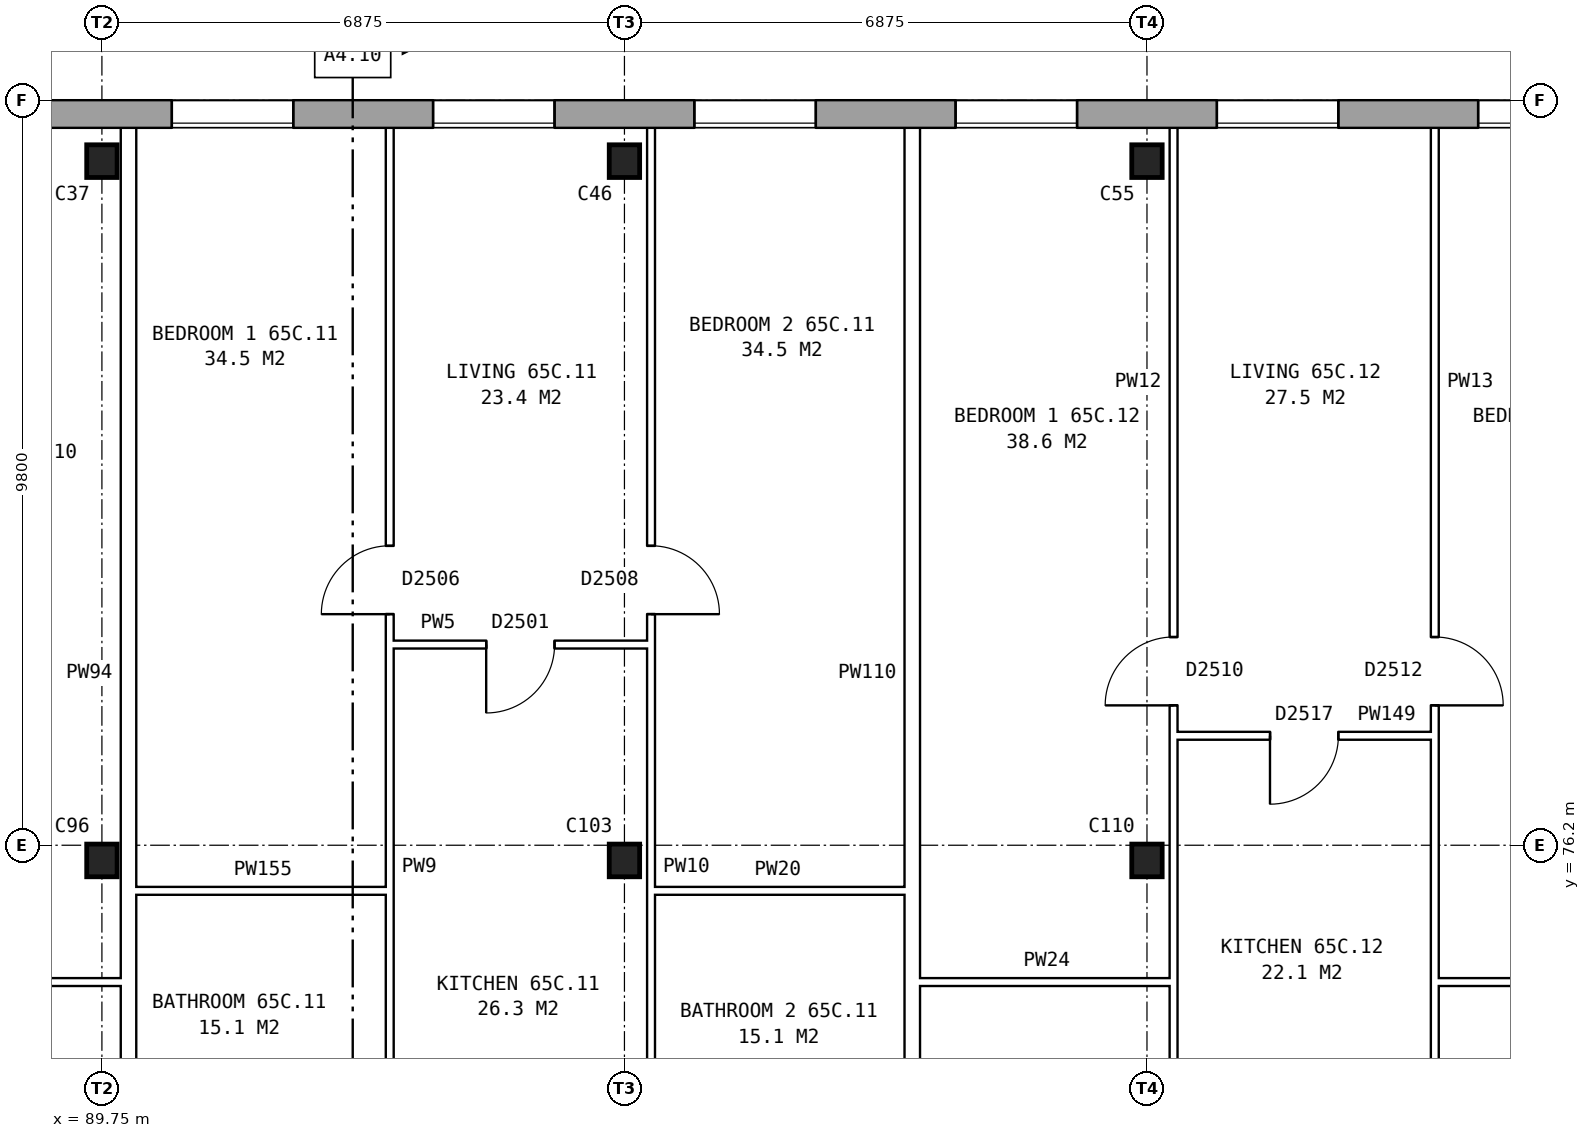
"""IFC4 building model, lengths in metres.
Left out: names, types, materials, properties, quantities, classifications, styles, units other than length and angle.
Written with IfcOpenShell. Run it as: python <this file> out.ifc"""

import sys

from ifc_helpers import new_model, si_unit, direction, frame, frame_2d, origin, origin_2d, place, context, subcontext, project, spatial, rectangle, i_section, extrude, element, fill, save


model = new_model("IFC4")
c1 = context("Model", 3, precision=1e-05, world=origin(), true_north=direction((0.0, 1.0)))
c2 = subcontext(c1, "Body", "Model", "MODEL_VIEW")
j1 = project(units=[si_unit("LENGTHUNIT", "METRE"), si_unit("PLANEANGLEUNIT", "RADIAN")], contexts=[c1])
p1 = place(None, origin())
s1 = spatial("IfcSite", under=j1, at=p1, CompositionType="ELEMENT")
p2 = place(p1, origin())
s2 = spatial("IfcBuilding", under=s1, at=p2, CompositionType="ELEMENT")
p3 = place(p2, frame((0.0, 0.0, 230.7)))
s3 = spatial("IfcBuildingStorey", under=s2, at=p3, CompositionType="ELEMENT", Elevation=230.7)
for number, where, z_axis, x_axis in (
    (1, (89.75, 76.0, 0.0), (0.0, 0.0, 1.0), (1.0, 0.0, 0.0)),
    (2, (96.625, 76.0, 0.0), (0.0, 0.0, 1.0), (1.0, 0.0, 0.0)),
    (3, (103.5, 76.0, 0.0), (0.0, 0.0, 1.0), (1.0, 0.0, 0.0)),
    (4, (89.75, 85.2, 0.0), (0.0, 0.0, 1.0), (1.0, 0.0, 0.0)),
    (5, (96.625, 85.2, 0.0), (0.0, 0.0, 1.0), (1.0, 0.0, 0.0)),
    (6, (103.5, 85.2, 0.0), (0.0, 0.0, 1.0), (1.0, 0.0, 0.0)),
):
    element("IfcColumn", number, at=place(p3, frame(where, z_axis=z_axis, x_axis=x_axis)), inside=s3, PredefinedType="COLUMN", context=c2, shape_type="SweptSolid", body=[
        extrude(i_section(OverallWidth=0.4, OverallDepth=0.43, WebThickness=0.028, FlangeThickness=0.04, at=origin_2d()), origin(), (0.0, 0.0, 1.0), 2.85),
    ])
p4 = place(p3, frame((131.05, 85.82, 0.0), z_axis=(0.0, 0.0, 1.0), x_axis=(-1.0, 0.0, 0.0)))
e7 = element("IfcWall", 7, at=p4, inside=s3, PredefinedType="STANDARD", context=c2, shape_type="SweptSolid", body=[
    extrude(rectangle(XDim=55.1, YDim=0.36, at=frame_2d((27.55, 0.0))), origin(), (0.0, 0.0, 1.0), 2.85),
])
p5 = place(p4, frame((0.969, 0.0, 0.8)))
e8 = element("IfcOpeningElement", 8, at=p5, cuts=e7, PredefinedType="OPENING", context=c2, shape_type="SweptSolid", body=[
    extrude(rectangle(XDim=1.6, YDim=1.8, at=frame_2d((0.8, 0.9))), frame((0.0, 0.19, 0.0), z_axis=(0.0, -1.0, 0.0), x_axis=(1.0, 0.0, 0.0)), (0.0, 0.0, 1.0), 0.38),
])
p6 = place(p4, frame((4.406, 0.0, 0.8)))
e9 = element("IfcOpeningElement", 9, at=p6, cuts=e7, PredefinedType="OPENING", context=c2, shape_type="SweptSolid", body=[
    extrude(rectangle(XDim=1.6, YDim=1.8, at=frame_2d((0.8, 0.9))), frame((0.0, 0.19, 0.0), z_axis=(0.0, -1.0, 0.0), x_axis=(1.0, 0.0, 0.0)), (0.0, 0.0, 1.0), 0.38),
])
p7 = place(p4, frame((7.844, 0.0, 0.8)))
e10 = element("IfcOpeningElement", 10, at=p7, cuts=e7, PredefinedType="OPENING", context=c2, shape_type="SweptSolid", body=[
    extrude(rectangle(XDim=1.6, YDim=1.8, at=frame_2d((0.8, 0.9))), frame((0.0, 0.19, 0.0), z_axis=(0.0, -1.0, 0.0), x_axis=(1.0, 0.0, 0.0)), (0.0, 0.0, 1.0), 0.38),
])
p8 = place(p4, frame((11.281, 0.0, 0.8)))
e11 = element("IfcOpeningElement", 11, at=p8, cuts=e7, PredefinedType="OPENING", context=c2, shape_type="SweptSolid", body=[
    extrude(rectangle(XDim=1.6, YDim=1.8, at=frame_2d((0.8, 0.9))), frame((0.0, 0.19, 0.0), z_axis=(0.0, -1.0, 0.0), x_axis=(1.0, 0.0, 0.0)), (0.0, 0.0, 1.0), 0.38),
])
p9 = place(p4, frame((14.719, 0.0, 0.8)))
e12 = element("IfcOpeningElement", 12, at=p9, cuts=e7, PredefinedType="OPENING", context=c2, shape_type="SweptSolid", body=[
    extrude(rectangle(XDim=1.6, YDim=1.8, at=frame_2d((0.8, 0.9))), frame((0.0, 0.19, 0.0), z_axis=(0.0, -1.0, 0.0), x_axis=(1.0, 0.0, 0.0)), (0.0, 0.0, 1.0), 0.38),
])
p10 = place(p4, frame((18.156, 0.0, 0.8)))
e13 = element("IfcOpeningElement", 13, at=p10, cuts=e7, PredefinedType="OPENING", context=c2, shape_type="SweptSolid", body=[
    extrude(rectangle(XDim=1.6, YDim=1.8, at=frame_2d((0.8, 0.9))), frame((0.0, 0.19, 0.0), z_axis=(0.0, -1.0, 0.0), x_axis=(1.0, 0.0, 0.0)), (0.0, 0.0, 1.0), 0.38),
])
p11 = place(p4, frame((21.594, 0.0, 0.8)))
e14 = element("IfcOpeningElement", 14, at=p11, cuts=e7, PredefinedType="OPENING", context=c2, shape_type="SweptSolid", body=[
    extrude(rectangle(XDim=1.6, YDim=1.8, at=frame_2d((0.8, 0.9))), frame((0.0, 0.19, 0.0), z_axis=(0.0, -1.0, 0.0), x_axis=(1.0, 0.0, 0.0)), (0.0, 0.0, 1.0), 0.38),
])
p12 = place(p4, frame((25.031, 0.0, 0.8)))
e15 = element("IfcOpeningElement", 15, at=p12, cuts=e7, PredefinedType="OPENING", context=c2, shape_type="SweptSolid", body=[
    extrude(rectangle(XDim=1.6, YDim=1.8, at=frame_2d((0.8, 0.9))), frame((0.0, 0.19, 0.0), z_axis=(0.0, -1.0, 0.0), x_axis=(1.0, 0.0, 0.0)), (0.0, 0.0, 1.0), 0.38),
])
p13 = place(p4, frame((28.469, 0.0, 0.8)))
e16 = element("IfcOpeningElement", 16, at=p13, cuts=e7, PredefinedType="OPENING", context=c2, shape_type="SweptSolid", body=[
    extrude(rectangle(XDim=1.6, YDim=1.8, at=frame_2d((0.8, 0.9))), frame((0.0, 0.19, 0.0), z_axis=(0.0, -1.0, 0.0), x_axis=(1.0, 0.0, 0.0)), (0.0, 0.0, 1.0), 0.38),
])
p14 = place(p4, frame((31.906, 0.0, 0.8)))
e17 = element("IfcOpeningElement", 17, at=p14, cuts=e7, PredefinedType="OPENING", context=c2, shape_type="SweptSolid", body=[
    extrude(rectangle(XDim=1.6, YDim=1.8, at=frame_2d((0.8, 0.9))), frame((0.0, 0.19, 0.0), z_axis=(0.0, -1.0, 0.0), x_axis=(1.0, 0.0, 0.0)), (0.0, 0.0, 1.0), 0.38),
])
p15 = place(p4, frame((35.344, 0.0, 0.8)))
e18 = element("IfcOpeningElement", 18, at=p15, cuts=e7, PredefinedType="OPENING", context=c2, shape_type="SweptSolid", body=[
    extrude(rectangle(XDim=1.6, YDim=1.8, at=frame_2d((0.8, 0.9))), frame((0.0, 0.19, 0.0), z_axis=(0.0, -1.0, 0.0), x_axis=(1.0, 0.0, 0.0)), (0.0, 0.0, 1.0), 0.38),
])
p16 = place(p4, frame((38.781, 0.0, 0.8)))
e19 = element("IfcOpeningElement", 19, at=p16, cuts=e7, PredefinedType="OPENING", context=c2, shape_type="SweptSolid", body=[
    extrude(rectangle(XDim=1.6, YDim=1.8, at=frame_2d((0.8, 0.9))), frame((0.0, 0.19, 0.0), z_axis=(0.0, -1.0, 0.0), x_axis=(1.0, 0.0, 0.0)), (0.0, 0.0, 1.0), 0.38),
])
p17 = place(p4, frame((42.219, 0.0, 0.8)))
e20 = element("IfcOpeningElement", 20, at=p17, cuts=e7, PredefinedType="OPENING", context=c2, shape_type="SweptSolid", body=[
    extrude(rectangle(XDim=1.6, YDim=1.8, at=frame_2d((0.8, 0.9))), frame((0.0, 0.19, 0.0), z_axis=(0.0, -1.0, 0.0), x_axis=(1.0, 0.0, 0.0)), (0.0, 0.0, 1.0), 0.38),
])
p18 = place(p4, frame((45.656, 0.0, 0.8)))
e21 = element("IfcOpeningElement", 21, at=p18, cuts=e7, PredefinedType="OPENING", context=c2, shape_type="SweptSolid", body=[
    extrude(rectangle(XDim=1.6, YDim=1.8, at=frame_2d((0.8, 0.9))), frame((0.0, 0.19, 0.0), z_axis=(0.0, -1.0, 0.0), x_axis=(1.0, 0.0, 0.0)), (0.0, 0.0, 1.0), 0.38),
])
p19 = place(p4, frame((49.094, 0.0, 0.8)))
e22 = element("IfcOpeningElement", 22, at=p19, cuts=e7, PredefinedType="OPENING", context=c2, shape_type="SweptSolid", body=[
    extrude(rectangle(XDim=1.6, YDim=1.8, at=frame_2d((0.8, 0.9))), frame((0.0, 0.19, 0.0), z_axis=(0.0, -1.0, 0.0), x_axis=(1.0, 0.0, 0.0)), (0.0, 0.0, 1.0), 0.38),
])
p20 = place(p4, frame((52.531, 0.0, 0.8)))
e23 = element("IfcOpeningElement", 23, at=p20, cuts=e7, PredefinedType="OPENING", context=c2, shape_type="SweptSolid", body=[
    extrude(rectangle(XDim=1.6, YDim=1.8, at=frame_2d((0.8, 0.9))), frame((0.0, 0.19, 0.0), z_axis=(0.0, -1.0, 0.0), x_axis=(1.0, 0.0, 0.0)), (0.0, 0.0, 1.0), 0.38),
])
p21 = place(p3, frame((86.662, 74.4, 0.0), z_axis=(0.0, 0.0, 1.0), x_axis=(1.0, 0.0, 0.0)))
e24 = element("IfcWall", 24, at=p21, inside=s3, PredefinedType="PARTITIONING", context=c2, shape_type="SweptSolid", body=[
    extrude(rectangle(XDim=3.338, YDim=0.1, at=frame_2d((1.669, 0.0))), origin(), (0.0, 0.0, 1.0), 2.85),
])
p22 = place(p3, frame((100.512, 74.4, 0.0), z_axis=(0.0, 0.0, 1.0), x_axis=(1.0, 0.0, 0.0)))
e25 = element("IfcWall", 25, at=p22, inside=s3, PredefinedType="PARTITIONING", context=c2, shape_type="SweptSolid", body=[
    extrude(rectangle(XDim=3.338, YDim=0.1, at=frame_2d((1.669, 0.0))), origin(), (0.0, 0.0, 1.0), 2.85),
])
p23 = place(p3, frame((107.287, 74.4, 0.0), z_axis=(0.0, 0.0, 1.0), x_axis=(1.0, 0.0, 0.0)))
e26 = element("IfcWall", 26, at=p23, inside=s3, PredefinedType="PARTITIONING", context=c2, shape_type="SweptSolid", body=[
    extrude(rectangle(XDim=6.875, YDim=0.1, at=frame_2d((3.438, 0.0))), origin(), (0.0, 0.0, 1.0), 2.85),
])
p24 = place(p3, frame((90.2, 75.6, 0.0), z_axis=(0.0, 0.0, 1.0), x_axis=(1.0, 0.0, 0.0)))
e27 = element("IfcWall", 27, at=p24, inside=s3, PredefinedType="PARTITIONING", context=c2, shape_type="SweptSolid", body=[
    extrude(rectangle(XDim=3.337, YDim=0.1, at=frame_2d((1.668, 0.0))), origin(), (0.0, 0.0, 1.0), 2.85),
])
p25 = place(p3, frame((96.975, 75.6, 0.0), z_axis=(0.0, 0.0, 1.0), x_axis=(1.0, 0.0, 0.0)))
e28 = element("IfcWall", 28, at=p25, inside=s3, PredefinedType="PARTITIONING", context=c2, shape_type="SweptSolid", body=[
    extrude(rectangle(XDim=3.337, YDim=0.1, at=frame_2d((1.668, 0.0))), origin(), (0.0, 0.0, 1.0), 2.85),
])
p26 = place(p3, frame((103.85, 77.64, 0.0), z_axis=(0.0, 0.0, 1.0), x_axis=(1.0, 0.0, 0.0)))
e29 = element("IfcWall", 29, at=p26, inside=s3, PredefinedType="PARTITIONING", context=c2, shape_type="SweptSolid", body=[
    extrude(rectangle(XDim=3.437, YDim=0.1, at=frame_2d((1.719, 0.0))), origin(), (0.0, 0.0, 1.0), 2.85),
])
p27 = place(p26, frame((1.269, 0.0, 0.0)))
e30 = element("IfcOpeningElement", 30, at=p27, cuts=e29, PredefinedType="OPENING", context=c2, shape_type="SweptSolid", body=[
    extrude(rectangle(XDim=0.9, YDim=2.1, at=frame_2d((0.45, 1.05))), frame((0.0, 0.06, 0.0), z_axis=(0.0, -1.0, 0.0), x_axis=(1.0, 0.0, 0.0)), (0.0, 0.0, 1.0), 0.12),
])
p28 = place(p3, frame((93.537, 78.84, 0.0), z_axis=(0.0, 0.0, 1.0), x_axis=(1.0, 0.0, 0.0)))
e31 = element("IfcWall", 31, at=p28, inside=s3, PredefinedType="PARTITIONING", context=c2, shape_type="SweptSolid", body=[
    extrude(rectangle(XDim=3.438, YDim=0.1, at=frame_2d((1.719, 0.0))), origin(), (0.0, 0.0, 1.0), 2.85),
])
p29 = place(p28, frame((1.269, 0.0, 0.0)))
e32 = element("IfcOpeningElement", 32, at=p29, cuts=e31, PredefinedType="OPENING", context=c2, shape_type="SweptSolid", body=[
    extrude(rectangle(XDim=0.9, YDim=2.1, at=frame_2d((0.45, 1.05))), frame((0.0, 0.06, 0.0), z_axis=(0.0, -1.0, 0.0), x_axis=(1.0, 0.0, 0.0)), (0.0, 0.0, 1.0), 0.12),
])
p30 = place(p3, frame((90.1, 71.3, 0.0), z_axis=(0.0, 0.0, 1.0), x_axis=(0.0, 1.0, 0.0)))
e33 = element("IfcWall", 33, at=p30, inside=s3, PredefinedType="PARTITIONING", context=c2, shape_type="SweptSolid", body=[
    extrude(rectangle(XDim=14.34, YDim=0.2, at=frame_2d((7.17, 0.0))), origin(), (0.0, 0.0, 1.0), 2.85),
])
p31 = place(p3, frame((93.537, 71.3, 0.0), z_axis=(0.0, 0.0, 1.0), x_axis=(0.0, 1.0, 0.0)))
e34 = element("IfcWall", 34, at=p31, inside=s3, PredefinedType="PARTITIONING", context=c2, shape_type="SweptSolid", body=[
    extrude(rectangle(XDim=14.34, YDim=0.1, at=frame_2d((7.17, 0.0))), origin(), (0.0, 0.0, 1.0), 2.85),
])
p32 = place(p31, frame((7.94, 0.0, 0.0)))
e35 = element("IfcOpeningElement", 35, at=p32, cuts=e34, PredefinedType="OPENING", context=c2, shape_type="SweptSolid", body=[
    extrude(rectangle(XDim=0.9, YDim=2.1, at=frame_2d((0.45, 1.05))), frame((0.0, 0.06, 0.0), z_axis=(0.0, -1.0, 0.0), x_axis=(1.0, 0.0, 0.0)), (0.0, 0.0, 1.0), 0.12),
])
p33 = place(p31, frame((0.4, 0.0, 0.0)))
e36 = element("IfcOpeningElement", 36, at=p33, cuts=e34, PredefinedType="OPENING", context=c2, shape_type="SweptSolid", body=[
    extrude(rectangle(XDim=0.9, YDim=2.1, at=frame_2d((0.45, 1.05))), frame((0.0, 0.06, 0.0), z_axis=(0.0, -1.0, 0.0), x_axis=(1.0, 0.0, 0.0)), (0.0, 0.0, 1.0), 0.12),
])
p34 = place(p3, frame((96.975, 71.3, 0.0), z_axis=(0.0, 0.0, 1.0), x_axis=(0.0, 1.0, 0.0)))
e37 = element("IfcWall", 37, at=p34, inside=s3, PredefinedType="PARTITIONING", context=c2, shape_type="SweptSolid", body=[
    extrude(rectangle(XDim=14.34, YDim=0.1, at=frame_2d((7.17, 0.0))), origin(), (0.0, 0.0, 1.0), 2.85),
])
p35 = place(p34, frame((7.94, 0.0, 0.0)))
e38 = element("IfcOpeningElement", 38, at=p35, cuts=e37, PredefinedType="OPENING", context=c2, shape_type="SweptSolid", body=[
    extrude(rectangle(XDim=0.9, YDim=2.1, at=frame_2d((0.45, 1.05))), frame((0.0, 0.06, 0.0), z_axis=(0.0, -1.0, 0.0), x_axis=(1.0, 0.0, 0.0)), (0.0, 0.0, 1.0), 0.12),
])
p36 = place(p34, frame((0.4, 0.0, 0.0)))
e39 = element("IfcOpeningElement", 39, at=p36, cuts=e37, PredefinedType="OPENING", context=c2, shape_type="SweptSolid", body=[
    extrude(rectangle(XDim=0.9, YDim=2.1, at=frame_2d((0.45, 1.05))), frame((0.0, 0.06, 0.0), z_axis=(0.0, -1.0, 0.0), x_axis=(1.0, 0.0, 0.0)), (0.0, 0.0, 1.0), 0.12),
])
p37 = place(p3, frame((100.412, 71.3, 0.0), z_axis=(0.0, 0.0, 1.0), x_axis=(0.0, 1.0, 0.0)))
e40 = element("IfcWall", 40, at=p37, inside=s3, PredefinedType="PARTITIONING", context=c2, shape_type="SweptSolid", body=[
    extrude(rectangle(XDim=14.34, YDim=0.2, at=frame_2d((7.17, 0.0))), origin(), (0.0, 0.0, 1.0), 2.85),
])
p38 = place(p3, frame((103.85, 71.3, 0.0), z_axis=(0.0, 0.0, 1.0), x_axis=(0.0, 1.0, 0.0)))
e41 = element("IfcWall", 41, at=p38, inside=s3, PredefinedType="PARTITIONING", context=c2, shape_type="SweptSolid", body=[
    extrude(rectangle(XDim=14.34, YDim=0.1, at=frame_2d((7.17, 0.0))), origin(), (0.0, 0.0, 1.0), 2.85),
])
p39 = place(p38, frame((6.74, 0.0, 0.0)))
e42 = element("IfcOpeningElement", 42, at=p39, cuts=e41, PredefinedType="OPENING", context=c2, shape_type="SweptSolid", body=[
    extrude(rectangle(XDim=0.9, YDim=2.1, at=frame_2d((0.45, 1.05))), frame((0.0, 0.06, 0.0), z_axis=(0.0, -1.0, 0.0), x_axis=(1.0, 0.0, 0.0)), (0.0, 0.0, 1.0), 0.12),
])
p40 = place(p38, frame((0.4, 0.0, 0.0)))
e43 = element("IfcOpeningElement", 43, at=p40, cuts=e41, PredefinedType="OPENING", context=c2, shape_type="SweptSolid", body=[
    extrude(rectangle(XDim=0.9, YDim=2.1, at=frame_2d((0.45, 1.05))), frame((0.0, 0.06, 0.0), z_axis=(0.0, -1.0, 0.0), x_axis=(1.0, 0.0, 0.0)), (0.0, 0.0, 1.0), 0.12),
])
p41 = place(p3, frame((107.287, 71.3, 0.0), z_axis=(0.0, 0.0, 1.0), x_axis=(0.0, 1.0, 0.0)))
e44 = element("IfcWall", 44, at=p41, inside=s3, PredefinedType="PARTITIONING", context=c2, shape_type="SweptSolid", body=[
    extrude(rectangle(XDim=14.34, YDim=0.1, at=frame_2d((7.17, 0.0))), origin(), (0.0, 0.0, 1.0), 2.85),
])
p42 = place(p41, frame((6.74, 0.0, 0.0)))
e45 = element("IfcOpeningElement", 45, at=p42, cuts=e44, PredefinedType="OPENING", context=c2, shape_type="SweptSolid", body=[
    extrude(rectangle(XDim=0.9, YDim=2.1, at=frame_2d((0.45, 1.05))), frame((0.0, 0.06, 0.0), z_axis=(0.0, -1.0, 0.0), x_axis=(1.0, 0.0, 0.0)), (0.0, 0.0, 1.0), 0.12),
])
p43 = place(p41, frame((0.4, 0.0, 0.0)))
e46 = element("IfcOpeningElement", 46, at=p43, cuts=e44, PredefinedType="OPENING", context=c2, shape_type="SweptSolid", body=[
    extrude(rectangle(XDim=0.9, YDim=2.1, at=frame_2d((0.45, 1.05))), frame((0.0, 0.06, 0.0), z_axis=(0.0, -1.0, 0.0), x_axis=(1.0, 0.0, 0.0)), (0.0, 0.0, 1.0), 0.12),
])
p44 = place(p11, origin())
e47 = element("IfcWindow", 47, at=p44, inside=s3, PartitioningType="SINGLE_PANEL", PredefinedType="WINDOW", context=c2, shape_type="SweptSolid", body=[
    extrude(rectangle(XDim=1.6, YDim=1.8, at=frame_2d((0.8, 0.9))), frame((0.0, 0.15, 0.0), z_axis=(0.0, -1.0, 0.0), x_axis=(1.0, 0.0, 0.0)), (0.0, 0.0, 1.0), 0.06),
])
fill(e14, e47)
p45 = place(p12, origin())
e48 = element("IfcWindow", 48, at=p45, inside=s3, PartitioningType="SINGLE_PANEL", PredefinedType="WINDOW", context=c2, shape_type="SweptSolid", body=[
    extrude(rectangle(XDim=1.6, YDim=1.8, at=frame_2d((0.8, 0.9))), frame((0.0, 0.15, 0.0), z_axis=(0.0, -1.0, 0.0), x_axis=(1.0, 0.0, 0.0)), (0.0, 0.0, 1.0), 0.06),
])
fill(e15, e48)
p46 = place(p13, origin())
e49 = element("IfcWindow", 49, at=p46, inside=s3, PartitioningType="SINGLE_PANEL", PredefinedType="WINDOW", context=c2, shape_type="SweptSolid", body=[
    extrude(rectangle(XDim=1.6, YDim=1.8, at=frame_2d((0.8, 0.9))), frame((0.0, 0.15, 0.0), z_axis=(0.0, -1.0, 0.0), x_axis=(1.0, 0.0, 0.0)), (0.0, 0.0, 1.0), 0.06),
])
fill(e16, e49)
p47 = place(p14, origin())
e50 = element("IfcWindow", 50, at=p47, inside=s3, PartitioningType="SINGLE_PANEL", PredefinedType="WINDOW", context=c2, shape_type="SweptSolid", body=[
    extrude(rectangle(XDim=1.6, YDim=1.8, at=frame_2d((0.8, 0.9))), frame((0.0, 0.15, 0.0), z_axis=(0.0, -1.0, 0.0), x_axis=(1.0, 0.0, 0.0)), (0.0, 0.0, 1.0), 0.06),
])
fill(e17, e50)
p48 = place(p15, origin())
e51 = element("IfcWindow", 51, at=p48, inside=s3, PartitioningType="SINGLE_PANEL", PredefinedType="WINDOW", context=c2, shape_type="SweptSolid", body=[
    extrude(rectangle(XDim=1.6, YDim=1.8, at=frame_2d((0.8, 0.9))), frame((0.0, 0.15, 0.0), z_axis=(0.0, -1.0, 0.0), x_axis=(1.0, 0.0, 0.0)), (0.0, 0.0, 1.0), 0.06),
])
fill(e18, e51)
p49 = place(p16, origin())
e52 = element("IfcWindow", 52, at=p49, inside=s3, PartitioningType="SINGLE_PANEL", PredefinedType="WINDOW", context=c2, shape_type="SweptSolid", body=[
    extrude(rectangle(XDim=1.6, YDim=1.8, at=frame_2d((0.8, 0.9))), frame((0.0, 0.15, 0.0), z_axis=(0.0, -1.0, 0.0), x_axis=(1.0, 0.0, 0.0)), (0.0, 0.0, 1.0), 0.06),
])
fill(e19, e52)
p50 = place(p32, origin())
e53 = element("IfcDoor", 53, at=p50, inside=s3, OperationType="SINGLE_SWING_LEFT", PredefinedType="DOOR", context=c2, shape_type="SweptSolid", body=[
    extrude(rectangle(XDim=0.9, YDim=2.1, at=frame_2d((0.45, 1.05))), frame((0.0, 0.025, 0.0), z_axis=(0.0, -1.0, 0.0), x_axis=(1.0, 0.0, 0.0)), (0.0, 0.0, 1.0), 0.05),
])
fill(e35, e53)
p51 = place(p35, frame((0.9, 0.0, 0.0), z_axis=(0.0, 0.0, 1.0), x_axis=(-1.0, 0.0, 0.0)))
e54 = element("IfcDoor", 54, at=p51, inside=s3, OperationType="SINGLE_SWING_RIGHT", PredefinedType="DOOR", context=c2, shape_type="SweptSolid", body=[
    extrude(rectangle(XDim=0.9, YDim=2.1, at=frame_2d((0.45, 1.05))), frame((0.0, 0.025, 0.0), z_axis=(0.0, -1.0, 0.0), x_axis=(1.0, 0.0, 0.0)), (0.0, 0.0, 1.0), 0.05),
])
fill(e38, e54)
p52 = place(p29, frame((0.9, 0.0, 0.0), z_axis=(0.0, 0.0, 1.0), x_axis=(-1.0, 0.0, 0.0)))
e55 = element("IfcDoor", 55, at=p52, inside=s3, OperationType="SINGLE_SWING_RIGHT", PredefinedType="DOOR", context=c2, shape_type="SweptSolid", body=[
    extrude(rectangle(XDim=0.9, YDim=2.1, at=frame_2d((0.45, 1.05))), frame((0.0, 0.025, 0.0), z_axis=(0.0, -1.0, 0.0), x_axis=(1.0, 0.0, 0.0)), (0.0, 0.0, 1.0), 0.05),
])
fill(e32, e55)
p53 = place(p39, origin())
e56 = element("IfcDoor", 56, at=p53, inside=s3, OperationType="SINGLE_SWING_LEFT", PredefinedType="DOOR", context=c2, shape_type="SweptSolid", body=[
    extrude(rectangle(XDim=0.9, YDim=2.1, at=frame_2d((0.45, 1.05))), frame((0.0, 0.025, 0.0), z_axis=(0.0, -1.0, 0.0), x_axis=(1.0, 0.0, 0.0)), (0.0, 0.0, 1.0), 0.05),
])
fill(e42, e56)
p54 = place(p42, frame((0.9, 0.0, 0.0), z_axis=(0.0, 0.0, 1.0), x_axis=(-1.0, 0.0, 0.0)))
e57 = element("IfcDoor", 57, at=p54, inside=s3, OperationType="SINGLE_SWING_RIGHT", PredefinedType="DOOR", context=c2, shape_type="SweptSolid", body=[
    extrude(rectangle(XDim=0.9, YDim=2.1, at=frame_2d((0.45, 1.05))), frame((0.0, 0.025, 0.0), z_axis=(0.0, -1.0, 0.0), x_axis=(1.0, 0.0, 0.0)), (0.0, 0.0, 1.0), 0.05),
])
fill(e45, e57)
p55 = place(p27, frame((0.9, 0.0, 0.0), z_axis=(0.0, 0.0, 1.0), x_axis=(-1.0, 0.0, 0.0)))
e58 = element("IfcDoor", 58, at=p55, inside=s3, OperationType="SINGLE_SWING_RIGHT", PredefinedType="DOOR", context=c2, shape_type="SweptSolid", body=[
    extrude(rectangle(XDim=0.9, YDim=2.1, at=frame_2d((0.45, 1.05))), frame((0.0, 0.025, 0.0), z_axis=(0.0, -1.0, 0.0), x_axis=(1.0, 0.0, 0.0)), (0.0, 0.0, 1.0), 0.05),
])
fill(e30, e58)
save(model, sys.argv[1])
